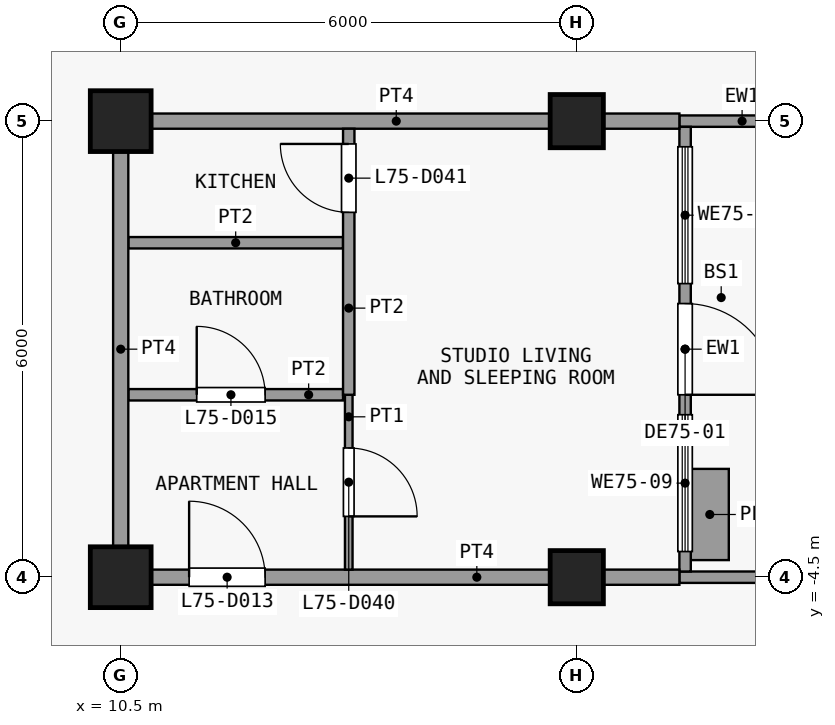
"""IFC4 building model, lengths in metres.
Left out: names, types, materials, properties, quantities, classifications, styles, units other than length and angle.
Written with IfcOpenShell. Run it as: python <this file> out.ifc"""

import sys

from ifc_helpers import new_model, si_unit, direction, frame, frame_2d, origin, origin_2d, place, context, subcontext, project, spatial, rectangle, extrude, element, fill, save


model = new_model("IFC4")
c1 = context("Model", 3, precision=1e-05, world=origin(), true_north=direction((0.0, 1.0)))
c2 = subcontext(c1, "Body", "Model", "MODEL_VIEW")
j1 = project(units=[si_unit("LENGTHUNIT", "METRE"), si_unit("PLANEANGLEUNIT", "RADIAN")], contexts=[c1])
p1 = place(None, origin())
s1 = spatial("IfcSite", under=j1, at=p1, CompositionType="ELEMENT")
p2 = place(p1, origin())
s2 = spatial("IfcBuilding", under=s1, at=p2, CompositionType="ELEMENT")
p3 = place(p2, frame((0.0, 0.0, 295.1)))
s3 = spatial("IfcBuildingStorey", under=s2, at=p3, CompositionType="ELEMENT", Elevation=295.1)
for number, where, z_axis, x_axis in (
    (1, (10.5, -4.5, 0.0), (0.0, 0.0, 1.0), (1.0, 0.0, 0.0)),
    (2, (10.5, 1.5, 0.0), (0.0, 0.0, 1.0), (1.0, 0.0, 0.0)),
):
    element("IfcColumn", number, at=place(p3, frame(where, z_axis=z_axis, x_axis=x_axis)), inside=s3, PredefinedType="COLUMN", context=c2, shape_type="SweptSolid", body=[
        extrude(rectangle(XDim=0.8, YDim=0.8, at=origin_2d()), origin(), (0.0, 0.0, 1.0), 3.6),
    ])
for number, where, z_axis, x_axis in (
    (3, (16.5, -4.5, 0.0), (0.0, 0.0, 1.0), (1.0, 0.0, 0.0)),
    (4, (16.5, 1.5, 0.0), (0.0, 0.0, 1.0), (1.0, 0.0, 0.0)),
):
    element("IfcColumn", number, at=place(p3, frame(where, z_axis=z_axis, x_axis=x_axis)), inside=s3, PredefinedType="COLUMN", context=c2, shape_type="SweptSolid", body=[
        extrude(rectangle(XDim=0.7, YDim=0.7, at=origin_2d()), origin(), (0.0, 0.0, 1.0), 3.6),
    ])
p4 = place(p3, frame((17.85, -4.5, 0.0), z_axis=(0.0, 0.0, 1.0), x_axis=(1.0, 0.0, 0.0)))
e5 = element("IfcWall", 5, at=p4, inside=s3, PredefinedType="SOLIDWALL", context=c2, shape_type="SweptSolid", body=[
    extrude(rectangle(XDim=2.55, YDim=0.15, at=frame_2d((1.275, 0.0))), origin(), (0.0, 0.0, 1.0), 3.2),
])
p5 = place(p3, frame((17.85, 1.5, 0.0), z_axis=(0.0, 0.0, 1.0), x_axis=(1.0, 0.0, 0.0)))
e6 = element("IfcWall", 6, at=p5, inside=s3, PredefinedType="SOLIDWALL", context=c2, shape_type="SweptSolid", body=[
    extrude(rectangle(XDim=1.65, YDim=0.15, at=frame_2d((0.825, 0.0))), origin(), (0.0, 0.0, 1.0), 3.2),
])
p6 = place(p3, frame((17.925, 1.425, 0.0), z_axis=(0.0, 0.0, 1.0), x_axis=(0.0, -1.0, 0.0)))
e7 = element("IfcWall", 7, at=p6, inside=s3, PredefinedType="SOLIDWALL", context=c2, shape_type="SweptSolid", body=[
    extrude(rectangle(XDim=5.85, YDim=0.15, at=frame_2d((2.925, 0.0))), origin(), (0.0, 0.0, 1.0), 3.2),
])
p7 = place(p6, frame((2.325, 0.0, 0.0)))
e8 = element("IfcOpeningElement", 8, at=p7, cuts=e7, PredefinedType="OPENING", context=c2, shape_type="SweptSolid", body=[
    extrude(rectangle(XDim=1.2, YDim=2.4, at=frame_2d((0.6, 1.2))), frame((0.0, 0.085, 0.0), z_axis=(0.0, -1.0, 0.0), x_axis=(1.0, 0.0, 0.0)), (0.0, 0.0, 1.0), 0.17),
])
p8 = place(p6, frame((3.788, 0.0, 0.9)))
e9 = element("IfcOpeningElement", 9, at=p8, cuts=e7, PredefinedType="OPENING", context=c2, shape_type="SweptSolid", body=[
    extrude(rectangle(XDim=1.8, YDim=2.1, at=frame_2d((0.9, 1.05))), frame((0.0, 0.085, 0.0), z_axis=(0.0, -1.0, 0.0), x_axis=(1.0, 0.0, 0.0)), (0.0, 0.0, 1.0), 0.17),
])
p9 = place(p6, frame((0.262, 0.0, 0.9)))
e10 = element("IfcOpeningElement", 10, at=p9, cuts=e7, PredefinedType="OPENING", context=c2, shape_type="SweptSolid", body=[
    extrude(rectangle(XDim=1.8, YDim=2.1, at=frame_2d((0.9, 1.05))), frame((0.0, 0.085, 0.0), z_axis=(0.0, -1.0, 0.0), x_axis=(1.0, 0.0, 0.0)), (0.0, 0.0, 1.0), 0.17),
])
p10 = place(p3, frame((18.25, -4.275, 0.0), z_axis=(0.0, 0.0, 1.0), x_axis=(0.0, 1.0, 0.0)))
e11 = element("IfcWall", 11, at=p10, inside=s3, PredefinedType="USERDEFINED", context=c2, shape_type="SweptSolid", body=[
    extrude(rectangle(XDim=1.2, YDim=0.5, at=frame_2d((0.6, 0.0))), origin(), (0.0, 0.0, 1.0), 0.9),
])
p11 = place(p3, frame((10.4, -4.5, 0.0), z_axis=(0.0, 0.0, 1.0), x_axis=(1.0, 0.0, 0.0)))
e12 = element("IfcWall", 12, at=p11, inside=s3, PredefinedType="PARTITIONING", context=c2, shape_type="SweptSolid", body=[
    extrude(rectangle(XDim=7.45, YDim=0.2, at=frame_2d((3.725, 0.0))), origin(), (0.0, 0.0, 1.0), 3.2),
])
p12 = place(p11, frame((1.0, 0.0, 0.0)))
e13 = element("IfcOpeningElement", 13, at=p12, cuts=e12, PredefinedType="OPENING", context=c2, shape_type="SweptSolid", body=[
    extrude(rectangle(XDim=1.0, YDim=2.1, at=frame_2d((0.5, 1.05))), frame((0.0, 0.11, 0.0), z_axis=(0.0, -1.0, 0.0), x_axis=(1.0, 0.0, 0.0)), (0.0, 0.0, 1.0), 0.22),
])
p13 = place(p3, frame((10.6, -2.1, 0.0), z_axis=(0.0, 0.0, 1.0), x_axis=(1.0, 0.0, 0.0)))
e14 = element("IfcWall", 14, at=p13, inside=s3, PredefinedType="PARTITIONING", context=c2, shape_type="SweptSolid", body=[
    extrude(rectangle(XDim=2.825, YDim=0.15, at=frame_2d((1.413, 0.0))), origin(), (0.0, 0.0, 1.0), 3.2),
])
p14 = place(p13, frame((0.9, 0.0, 0.0)))
e15 = element("IfcOpeningElement", 15, at=p14, cuts=e14, PredefinedType="OPENING", context=c2, shape_type="SweptSolid", body=[
    extrude(rectangle(XDim=0.9, YDim=2.1, at=frame_2d((0.45, 1.05))), frame((0.0, 0.085, 0.0), z_axis=(0.0, -1.0, 0.0), x_axis=(1.0, 0.0, 0.0)), (0.0, 0.0, 1.0), 0.17),
])
p15 = place(p3, frame((10.6, -0.1, 0.0), z_axis=(0.0, 0.0, 1.0), x_axis=(1.0, 0.0, 0.0)))
e16 = element("IfcWall", 16, at=p15, inside=s3, PredefinedType="PARTITIONING", context=c2, shape_type="SweptSolid", body=[
    extrude(rectangle(XDim=2.825, YDim=0.15, at=frame_2d((1.413, 0.0))), origin(), (0.0, 0.0, 1.0), 3.2),
])
p16 = place(p3, frame((10.4, 1.5, 0.0), z_axis=(0.0, 0.0, 1.0), x_axis=(1.0, 0.0, 0.0)))
e17 = element("IfcWall", 17, at=p16, inside=s3, PredefinedType="PARTITIONING", context=c2, shape_type="SweptSolid", body=[
    extrude(rectangle(XDim=7.45, YDim=0.2, at=frame_2d((3.725, 0.0))), origin(), (0.0, 0.0, 1.0), 3.2),
])
p17 = place(p3, frame((10.5, -4.4, 0.0), z_axis=(0.0, 0.0, 1.0), x_axis=(0.0, 1.0, 0.0)))
e18 = element("IfcWall", 18, at=p17, inside=s3, PredefinedType="PARTITIONING", context=c2, shape_type="SweptSolid", body=[
    extrude(rectangle(XDim=5.8, YDim=0.2, at=frame_2d((2.9, 0.0))), origin(), (0.0, 0.0, 1.0), 3.2),
])
p18 = place(p3, frame((13.5, -4.4, 0.0), z_axis=(0.0, 0.0, 1.0), x_axis=(0.0, 1.0, 0.0)))
e19 = element("IfcWall", 19, at=p18, inside=s3, PredefinedType="PARTITIONING", context=c2, shape_type="SweptSolid", body=[
    extrude(rectangle(XDim=2.3, YDim=0.1, at=frame_2d((1.15, 0.0))), origin(), (0.0, 0.0, 1.0), 3.2),
])
p19 = place(p18, frame((0.7, 0.0, 0.0)))
e20 = element("IfcOpeningElement", 20, at=p19, cuts=e19, PredefinedType="OPENING", context=c2, shape_type="SweptSolid", body=[
    extrude(rectangle(XDim=0.9, YDim=2.1, at=frame_2d((0.45, 1.05))), frame((0.0, 0.06, 0.0), z_axis=(0.0, -1.0, 0.0), x_axis=(1.0, 0.0, 0.0)), (0.0, 0.0, 1.0), 0.12),
])
p20 = place(p3, frame((13.5, -2.1, 0.0), z_axis=(0.0, 0.0, 1.0), x_axis=(0.0, 1.0, 0.0)))
e21 = element("IfcWall", 21, at=p20, inside=s3, PredefinedType="PARTITIONING", context=c2, shape_type="SweptSolid", body=[
    extrude(rectangle(XDim=3.5, YDim=0.15, at=frame_2d((1.75, 0.0))), origin(), (0.0, 0.0, 1.0), 3.2),
])
p21 = place(p20, frame((2.4, 0.0, 0.0)))
e22 = element("IfcOpeningElement", 22, at=p21, cuts=e21, PredefinedType="OPENING", context=c2, shape_type="SweptSolid", body=[
    extrude(rectangle(XDim=0.9, YDim=2.1, at=frame_2d((0.45, 1.05))), frame((0.0, 0.085, 0.0), z_axis=(0.0, -1.0, 0.0), x_axis=(1.0, 0.0, 0.0)), (0.0, 0.0, 1.0), 0.17),
])
p22 = place(p7, origin())
e23 = element("IfcDoor", 23, at=p22, inside=s3, OperationType="SINGLE_SWING_RIGHT", PredefinedType="DOOR", context=c2, shape_type="SweptSolid", body=[
    extrude(rectangle(XDim=1.2, YDim=2.4, at=frame_2d((0.6, 1.2))), frame((0.0, 0.025, 0.0), z_axis=(0.0, -1.0, 0.0), x_axis=(1.0, 0.0, 0.0)), (0.0, 0.0, 1.0), 0.05),
])
fill(e8, e23)
p23 = place(p8, origin())
e24 = element("IfcWindow", 24, at=p23, inside=s3, PartitioningType="SINGLE_PANEL", PredefinedType="WINDOW", context=c2, shape_type="SweptSolid", body=[
    extrude(rectangle(XDim=1.8, YDim=2.1, at=frame_2d((0.9, 1.05))), frame((0.0, 0.03, 0.0), z_axis=(0.0, -1.0, 0.0), x_axis=(1.0, 0.0, 0.0)), (0.0, 0.0, 1.0), 0.06),
])
fill(e9, e24)
p24 = place(p9, origin())
e25 = element("IfcWindow", 25, at=p24, inside=s3, PartitioningType="SINGLE_PANEL", PredefinedType="WINDOW", context=c2, shape_type="SweptSolid", body=[
    extrude(rectangle(XDim=1.8, YDim=2.1, at=frame_2d((0.9, 1.05))), frame((0.0, 0.03, 0.0), z_axis=(0.0, -1.0, 0.0), x_axis=(1.0, 0.0, 0.0)), (0.0, 0.0, 1.0), 0.06),
])
fill(e10, e25)
p25 = place(p12, origin())
e26 = element("IfcDoor", 26, at=p25, inside=s3, OperationType="SINGLE_SWING_RIGHT", PredefinedType="DOOR", context=c2, shape_type="SweptSolid", body=[
    extrude(rectangle(XDim=1.0, YDim=2.1, at=frame_2d((0.5, 1.05))), frame((0.0, 0.025, 0.0), z_axis=(0.0, -1.0, 0.0), x_axis=(1.0, 0.0, 0.0)), (0.0, 0.0, 1.0), 0.05),
])
fill(e13, e26)
p26 = place(p14, origin())
e27 = element("IfcDoor", 27, at=p26, inside=s3, OperationType="SINGLE_SWING_RIGHT", PredefinedType="DOOR", context=c2, shape_type="SweptSolid", body=[
    extrude(rectangle(XDim=0.9, YDim=2.1, at=frame_2d((0.45, 1.05))), frame((0.0, 0.025, 0.0), z_axis=(0.0, -1.0, 0.0), x_axis=(1.0, 0.0, 0.0)), (0.0, 0.0, 1.0), 0.05),
])
fill(e15, e27)
p27 = place(p19, origin())
e28 = element("IfcDoor", 28, at=p27, inside=s3, OperationType="SINGLE_SWING_LEFT", PredefinedType="DOOR", context=c2, shape_type="SweptSolid", body=[
    extrude(rectangle(XDim=0.9, YDim=2.1, at=frame_2d((0.45, 1.05))), frame((0.0, 0.025, 0.0), z_axis=(0.0, -1.0, 0.0), x_axis=(1.0, 0.0, 0.0)), (0.0, 0.0, 1.0), 0.05),
])
fill(e20, e28)
p28 = place(p21, origin())
e29 = element("IfcDoor", 29, at=p28, inside=s3, OperationType="SINGLE_SWING_LEFT", PredefinedType="DOOR", context=c2, shape_type="SweptSolid", body=[
    extrude(rectangle(XDim=0.9, YDim=2.1, at=frame_2d((0.45, 1.05))), frame((0.0, 0.025, 0.0), z_axis=(0.0, -1.0, 0.0), x_axis=(1.0, 0.0, 0.0)), (0.0, 0.0, 1.0), 0.05),
])
fill(e22, e29)
save(model, sys.argv[1])
